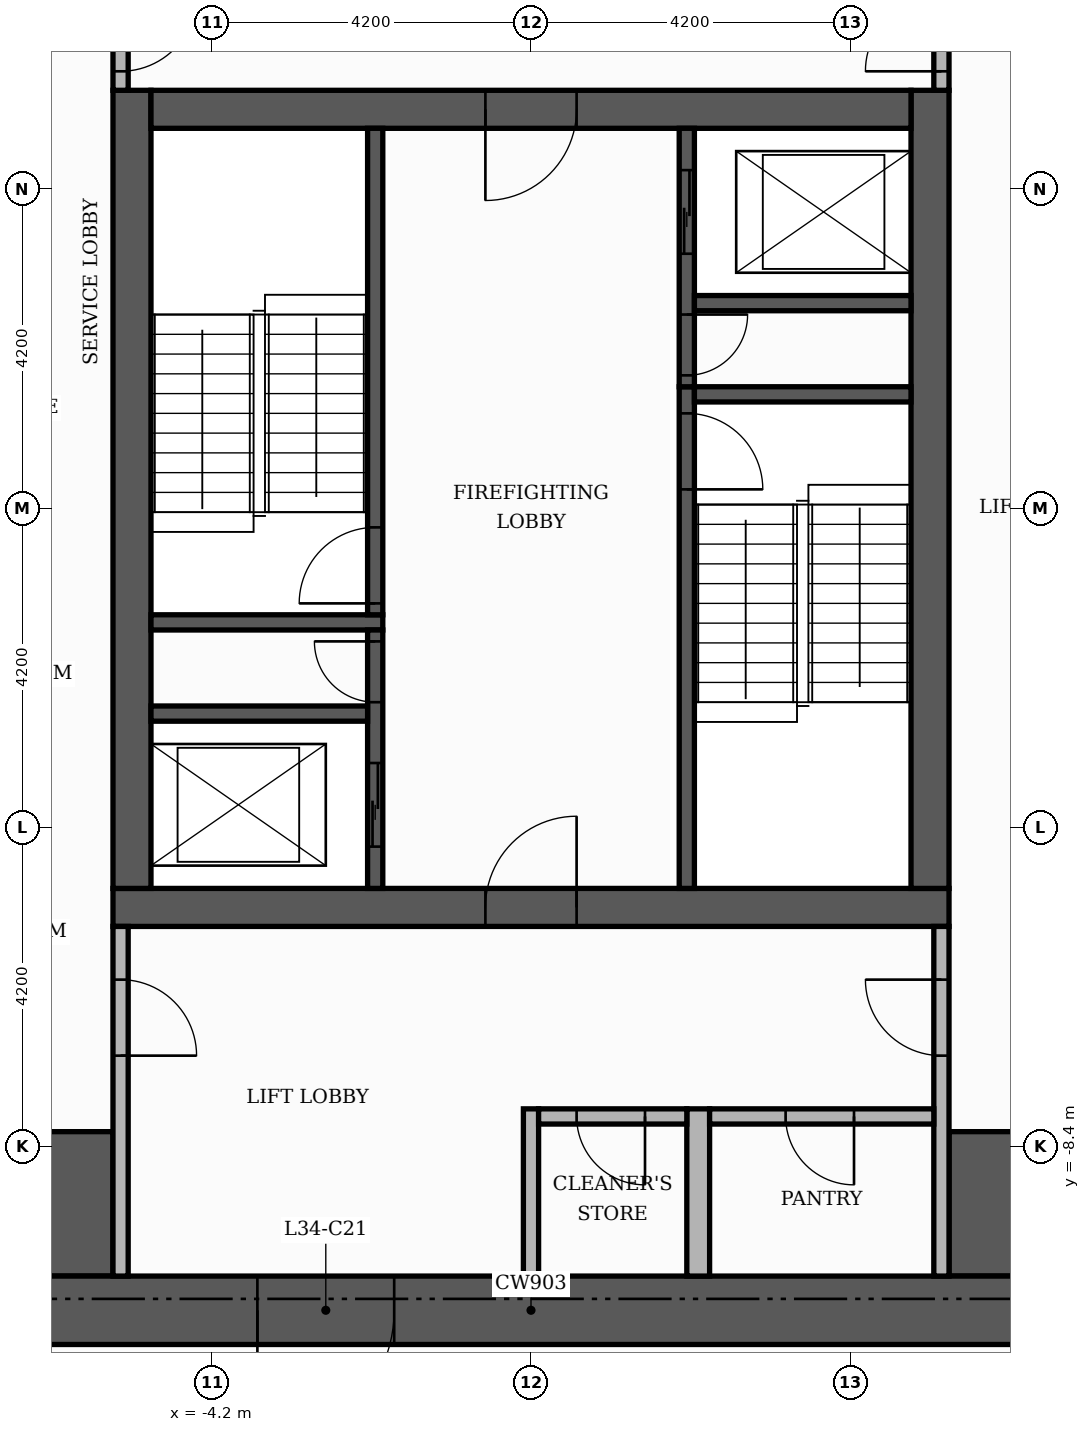
"""IFC4 building model, lengths in metres.
Left out: names, types, materials, properties, quantities, classifications, styles, units other than length and angle.
Written with IfcOpenShell. Run it as: python <this file> out.ifc"""

import sys

from ifc_helpers import new_model, si_unit, direction, frame, frame_2d, origin, place, context, subcontext, project, spatial, rectangle, extrude, element, fill, save


model = new_model("IFC4")
c1 = context("Model", 3, precision=1e-05, world=origin(), true_north=direction((0.0, 1.0)))
c2 = subcontext(c1, "Body", "Model", "MODEL_VIEW")
j1 = project(units=[si_unit("LENGTHUNIT", "METRE"), si_unit("PLANEANGLEUNIT", "RADIAN")], contexts=[c1])
p1 = place(None, origin())
s1 = spatial("IfcSite", under=j1, at=p1, CompositionType="ELEMENT")
p2 = place(p1, origin())
s2 = spatial("IfcBuilding", under=s1, at=p2, CompositionType="ELEMENT")
p3 = place(p2, frame((0.0, 0.0, 145.5)))
s3 = spatial("IfcBuildingStorey", under=s2, at=p3, CompositionType="ELEMENT", Elevation=145.5)
p4 = place(p3, frame((-5.5, -5.25, 0.0), z_axis=(0.0, 0.0, 1.0), x_axis=(1.0, 0.0, 0.0)))
e1 = element("IfcWall", 1, at=p4, inside=s3, PredefinedType="SHEAR", context=c2, shape_type="SweptSolid", body=[
    extrude(rectangle(XDim=11.0, YDim=0.5, at=frame_2d((5.5, 0.0))), origin(), (0.0, 0.0, 1.0), 3.48),
])
p5 = place(p4, frame((4.9, 0.0, 0.0)))
e2 = element("IfcOpeningElement", 2, at=p5, cuts=e1, PredefinedType="OPENING", context=c2, shape_type="SweptSolid", body=[
    extrude(rectangle(XDim=1.2, YDim=2.1, at=frame_2d((0.6, 1.05))), frame((0.0, 0.26, 0.0), z_axis=(0.0, -1.0, 0.0), x_axis=(1.0, 0.0, 0.0)), (0.0, 0.0, 1.0), 0.52),
])
for number, where, z_axis, x_axis in (
    (3, (-5.25, -5.0, 0.0), (0.0, 0.0, 1.0), (0.0, 1.0, 0.0)),
    (4, (5.25, -5.0, 0.0), (0.0, 0.0, 1.0), (0.0, 1.0, 0.0)),
):
    element("IfcWall", number, at=place(p3, frame(where, z_axis=z_axis, x_axis=x_axis)), inside=s3, PredefinedType="SHEAR", context=c2, shape_type="SweptSolid", body=[
        extrude(rectangle(XDim=10.5, YDim=0.5, at=frame_2d((5.25, 0.0))), origin(), (0.0, 0.0, 1.0), 3.48),
    ])
p6 = place(p3, frame((-5.0, 5.25, 0.0), z_axis=(0.0, 0.0, 1.0), x_axis=(1.0, 0.0, 0.0)))
e5 = element("IfcWall", 5, at=p6, inside=s3, PredefinedType="SHEAR", context=c2, shape_type="SweptSolid", body=[
    extrude(rectangle(XDim=10.0, YDim=0.5, at=frame_2d((5.0, 0.0))), origin(), (0.0, 0.0, 1.0), 3.48),
])
p7 = place(p6, frame((4.4, 0.0, 0.0)))
e6 = element("IfcOpeningElement", 6, at=p7, cuts=e5, PredefinedType="OPENING", context=c2, shape_type="SweptSolid", body=[
    extrude(rectangle(XDim=1.2, YDim=2.1, at=frame_2d((0.6, 1.05))), frame((0.0, 0.26, 0.0), z_axis=(0.0, -1.0, 0.0), x_axis=(1.0, 0.0, 0.0)), (0.0, 0.0, 1.0), 0.52),
])
for number, where, z_axis, x_axis in (
    (7, (-10.1, -9.15, 0.0), (0.0, 0.0, 1.0), (1.0, 0.0, 0.0)),
    (8, (5.5, -9.15, 0.0), (0.0, 0.0, 1.0), (1.0, 0.0, 0.0)),
):
    element("IfcWall", number, at=place(p3, frame(where, z_axis=z_axis, x_axis=x_axis)), inside=s3, PredefinedType="SHEAR", context=c2, shape_type="SweptSolid", body=[
        extrude(rectangle(XDim=4.6, YDim=1.9, at=frame_2d((2.3, 0.0))), origin(), (0.0, 0.0, 1.0), 3.48),
    ])
p8 = place(p3, frame((2.05, -5.0, 0.0), z_axis=(0.0, 0.0, 1.0), x_axis=(0.0, 1.0, 0.0)))
e9 = element("IfcWall", 9, at=p8, inside=s3, PredefinedType="SHEAR", context=c2, shape_type="SweptSolid", body=[
    extrude(rectangle(XDim=6.6, YDim=0.2, at=frame_2d((3.3, 0.0))), origin(), (0.0, 0.0, 1.0), 3.48),
])
p9 = place(p8, frame((5.25, 0.0, 0.0)))
e10 = element("IfcOpeningElement", 10, at=p9, cuts=e9, PredefinedType="OPENING", context=c2, shape_type="SweptSolid", body=[
    extrude(rectangle(XDim=1.0, YDim=2.1, at=frame_2d((0.5, 1.05))), frame((0.0, 0.11, 0.0), z_axis=(0.0, -1.0, 0.0), x_axis=(1.0, 0.0, 0.0)), (0.0, 0.0, 1.0), 0.22),
])
p10 = place(p3, frame((-5.0, -1.5, 0.0), z_axis=(0.0, 0.0, 1.0), x_axis=(1.0, 0.0, 0.0)))
e11 = element("IfcWall", 11, at=p10, inside=s3, PredefinedType="SHEAR", context=c2, shape_type="SweptSolid", body=[
    extrude(rectangle(XDim=3.05, YDim=0.2, at=frame_2d((1.525, 0.0))), origin(), (0.0, 0.0, 1.0), 3.48),
])
p11 = place(p3, frame((-2.05, -1.4, 0.0), z_axis=(0.0, 0.0, 1.0), x_axis=(0.0, 1.0, 0.0)))
e12 = element("IfcWall", 12, at=p11, inside=s3, PredefinedType="SHEAR", context=c2, shape_type="SweptSolid", body=[
    extrude(rectangle(XDim=6.4, YDim=0.2, at=frame_2d((3.2, 0.0))), origin(), (0.0, 0.0, 1.0), 3.48),
])
p12 = place(p11, frame((0.15, 0.0, 0.0)))
e13 = element("IfcOpeningElement", 13, at=p12, cuts=e12, PredefinedType="OPENING", context=c2, shape_type="SweptSolid", body=[
    extrude(rectangle(XDim=1.0, YDim=2.1, at=frame_2d((0.5, 1.05))), frame((0.0, 0.11, 0.0), z_axis=(0.0, -1.0, 0.0), x_axis=(1.0, 0.0, 0.0)), (0.0, 0.0, 1.0), 0.22),
])
p13 = place(p3, frame((2.15, 1.5, 0.0), z_axis=(0.0, 0.0, 1.0), x_axis=(1.0, 0.0, 0.0)))
e14 = element("IfcWall", 14, at=p13, inside=s3, PredefinedType="SHEAR", context=c2, shape_type="SweptSolid", body=[
    extrude(rectangle(XDim=2.85, YDim=0.2, at=frame_2d((1.425, 0.0))), origin(), (0.0, 0.0, 1.0), 3.48),
])
p14 = place(p3, frame((-2.05, -5.0, 0.0), z_axis=(0.0, 0.0, 1.0), x_axis=(0.0, 1.0, 0.0)))
e15 = element("IfcWall", 15, at=p14, inside=s3, PredefinedType="SHEAR", context=c2, shape_type="SweptSolid", body=[
    extrude(rectangle(XDim=3.4, YDim=0.2, at=frame_2d((1.7, 0.0))), origin(), (0.0, 0.0, 1.0), 3.48),
])
p15 = place(p14, frame((0.55, 0.0, 0.0)))
e16 = element("IfcOpeningElement", 16, at=p15, cuts=e15, PredefinedType="OPENING", context=c2, shape_type="SweptSolid", body=[
    extrude(rectangle(XDim=1.1, YDim=2.1, at=frame_2d((0.55, 1.05))), frame((0.0, 0.11, 0.0), z_axis=(0.0, -1.0, 0.0), x_axis=(1.0, 0.0, 0.0)), (0.0, 0.0, 1.0), 0.22),
])
p16 = place(p14, frame((2.45, 0.0, 0.0)))
e17 = element("IfcOpeningElement", 17, at=p16, cuts=e15, PredefinedType="OPENING", context=c2, shape_type="SweptSolid", body=[
    extrude(rectangle(XDim=0.8, YDim=2.1, at=frame_2d((0.4, 1.05))), frame((0.0, 0.11, 0.0), z_axis=(0.0, -1.0, 0.0), x_axis=(1.0, 0.0, 0.0)), (0.0, 0.0, 1.0), 0.22),
])
p17 = place(p3, frame((-5.0, -2.7, 0.0), z_axis=(0.0, 0.0, 1.0), x_axis=(1.0, 0.0, 0.0)))
e18 = element("IfcWall", 18, at=p17, inside=s3, PredefinedType="SHEAR", context=c2, shape_type="SweptSolid", body=[
    extrude(rectangle(XDim=2.85, YDim=0.2, at=frame_2d((1.425, 0.0))), origin(), (0.0, 0.0, 1.0), 3.48),
])
p18 = place(p3, frame((2.05, 1.6, 0.0), z_axis=(0.0, 0.0, 1.0), x_axis=(0.0, 1.0, 0.0)))
e19 = element("IfcWall", 19, at=p18, inside=s3, PredefinedType="SHEAR", context=c2, shape_type="SweptSolid", body=[
    extrude(rectangle(XDim=3.4, YDim=0.2, at=frame_2d((1.7, 0.0))), origin(), (0.0, 0.0, 1.0), 3.48),
])
p19 = place(p18, frame((1.75, 0.0, 0.0)))
e20 = element("IfcOpeningElement", 20, at=p19, cuts=e19, PredefinedType="OPENING", context=c2, shape_type="SweptSolid", body=[
    extrude(rectangle(XDim=1.1, YDim=2.1, at=frame_2d((0.55, 1.05))), frame((0.0, 0.11, 0.0), z_axis=(0.0, -1.0, 0.0), x_axis=(1.0, 0.0, 0.0)), (0.0, 0.0, 1.0), 0.22),
])
p20 = place(p18, frame((0.15, 0.0, 0.0)))
e21 = element("IfcOpeningElement", 21, at=p20, cuts=e19, PredefinedType="OPENING", context=c2, shape_type="SweptSolid", body=[
    extrude(rectangle(XDim=0.8, YDim=2.1, at=frame_2d((0.4, 1.05))), frame((0.0, 0.11, 0.0), z_axis=(0.0, -1.0, 0.0), x_axis=(1.0, 0.0, 0.0)), (0.0, 0.0, 1.0), 0.22),
])
p21 = place(p3, frame((2.15, 2.7, 0.0), z_axis=(0.0, 0.0, 1.0), x_axis=(1.0, 0.0, 0.0)))
e22 = element("IfcWall", 22, at=p21, inside=s3, PredefinedType="SHEAR", context=c2, shape_type="SweptSolid", body=[
    extrude(rectangle(XDim=2.85, YDim=0.2, at=frame_2d((1.425, 0.0))), origin(), (0.0, 0.0, 1.0), 3.48),
])
p22 = place(p3, frame((-11.0, -10.55, 0.0), z_axis=(0.0, 0.0, 1.0), x_axis=(1.0, 0.0, 0.0)))
e23 = element("IfcWall", 23, at=p22, inside=s3, PredefinedType="SHEAR", context=c2, shape_type="SweptSolid", body=[
    extrude(rectangle(XDim=22.0, YDim=0.9, at=frame_2d((11.0, 0.0))), origin(), (0.0, 0.0, 1.0), 3.48),
])
p23 = place(p22, frame((7.4, 0.0, 0.0)))
e24 = element("IfcOpeningElement", 24, at=p23, cuts=e23, PredefinedType="OPENING", context=c2, shape_type="SweptSolid", body=[
    extrude(rectangle(XDim=1.8, YDim=2.2, at=frame_2d((0.9, 1.1))), frame((0.0, 0.46, 0.0), z_axis=(0.0, -1.0, 0.0), x_axis=(1.0, 0.0, 0.0)), (0.0, 0.0, 1.0), 0.92),
])
p24 = place(p3, frame((-5.4, -10.1, 0.0), z_axis=(0.0, 0.0, 1.0), x_axis=(0.0, 1.0, 0.0)))
e25 = element("IfcWall", 25, at=p24, inside=s3, PredefinedType="PARTITIONING", context=c2, shape_type="SweptSolid", body=[
    extrude(rectangle(XDim=4.6, YDim=0.2, at=frame_2d((2.3, 0.0))), origin(), (0.0, 0.0, 1.0), 3.48),
])
p25 = place(p24, frame((2.9, 0.0, 0.0)))
e26 = element("IfcOpeningElement", 26, at=p25, cuts=e25, PredefinedType="OPENING", context=c2, shape_type="SweptSolid", body=[
    extrude(rectangle(XDim=1.0, YDim=2.1, at=frame_2d((0.5, 1.05))), frame((0.0, 0.11, 0.0), z_axis=(0.0, -1.0, 0.0), x_axis=(1.0, 0.0, 0.0)), (0.0, 0.0, 1.0), 0.22),
])
p26 = place(p3, frame((0.0, -10.1, 0.0), z_axis=(0.0, 0.0, 1.0), x_axis=(0.0, 1.0, 0.0)))
e27 = element("IfcWall", 27, at=p26, inside=s3, PredefinedType="PARTITIONING", context=c2, shape_type="SweptSolid", body=[
    extrude(rectangle(XDim=2.2, YDim=0.2, at=frame_2d((1.1, 0.0))), origin(), (0.0, 0.0, 1.0), 3.48),
])
p27 = place(p3, frame((2.2, -10.1, 0.0), z_axis=(0.0, 0.0, 1.0), x_axis=(0.0, 1.0, 0.0)))
e28 = element("IfcWall", 28, at=p27, inside=s3, PredefinedType="PARTITIONING", context=c2, shape_type="SweptSolid", body=[
    extrude(rectangle(XDim=2.2, YDim=0.3, at=frame_2d((1.1, 0.0))), origin(), (0.0, 0.0, 1.0), 3.48),
])
p28 = place(p3, frame((5.4, -10.1, 0.0), z_axis=(0.0, 0.0, 1.0), x_axis=(0.0, 1.0, 0.0)))
e29 = element("IfcWall", 29, at=p28, inside=s3, PredefinedType="PARTITIONING", context=c2, shape_type="SweptSolid", body=[
    extrude(rectangle(XDim=4.6, YDim=0.2, at=frame_2d((2.3, 0.0))), origin(), (0.0, 0.0, 1.0), 3.48),
])
p29 = place(p28, frame((2.9, 0.0, 0.0)))
e30 = element("IfcOpeningElement", 30, at=p29, cuts=e29, PredefinedType="OPENING", context=c2, shape_type="SweptSolid", body=[
    extrude(rectangle(XDim=1.0, YDim=2.1, at=frame_2d((0.5, 1.05))), frame((0.0, 0.11, 0.0), z_axis=(0.0, -1.0, 0.0), x_axis=(1.0, 0.0, 0.0)), (0.0, 0.0, 1.0), 0.22),
])
p30 = place(p3, frame((0.1, -8.0, 0.0), z_axis=(0.0, 0.0, 1.0), x_axis=(1.0, 0.0, 0.0)))
e31 = element("IfcWall", 31, at=p30, inside=s3, PredefinedType="PARTITIONING", context=c2, shape_type="SweptSolid", body=[
    extrude(rectangle(XDim=1.95, YDim=0.2, at=frame_2d((0.975, 0.0))), origin(), (0.0, 0.0, 1.0), 3.48),
])
p31 = place(p30, frame((0.5, 0.0, 0.0)))
e32 = element("IfcOpeningElement", 32, at=p31, cuts=e31, PredefinedType="OPENING", context=c2, shape_type="SweptSolid", body=[
    extrude(rectangle(XDim=0.9, YDim=2.1, at=frame_2d((0.45, 1.05))), frame((0.0, 0.11, 0.0), z_axis=(0.0, -1.0, 0.0), x_axis=(1.0, 0.0, 0.0)), (0.0, 0.0, 1.0), 0.22),
])
p32 = place(p3, frame((2.35, -8.0, 0.0), z_axis=(0.0, 0.0, 1.0), x_axis=(1.0, 0.0, 0.0)))
e33 = element("IfcWall", 33, at=p32, inside=s3, PredefinedType="PARTITIONING", context=c2, shape_type="SweptSolid", body=[
    extrude(rectangle(XDim=2.95, YDim=0.2, at=frame_2d((1.475, 0.0))), origin(), (0.0, 0.0, 1.0), 3.48),
])
p33 = place(p32, frame((1.0, 0.0, 0.0)))
e34 = element("IfcOpeningElement", 34, at=p33, cuts=e33, PredefinedType="OPENING", context=c2, shape_type="SweptSolid", body=[
    extrude(rectangle(XDim=0.9, YDim=2.1, at=frame_2d((0.45, 1.05))), frame((0.0, 0.11, 0.0), z_axis=(0.0, -1.0, 0.0), x_axis=(1.0, 0.0, 0.0)), (0.0, 0.0, 1.0), 0.22),
])
p34 = place(p3, frame((-5.4, 5.5, 0.0), z_axis=(0.0, 0.0, 1.0), x_axis=(0.0, 1.0, 0.0)))
e35 = element("IfcWall", 35, at=p34, inside=s3, PredefinedType="PARTITIONING", context=c2, shape_type="SweptSolid", body=[
    extrude(rectangle(XDim=1.55, YDim=0.2, at=frame_2d((0.775, 0.0))), origin(), (0.0, 0.0, 1.0), 3.48),
])
p35 = place(p34, frame((0.25, 0.0, 0.0)))
e36 = element("IfcOpeningElement", 36, at=p35, cuts=e35, PredefinedType="OPENING", context=c2, shape_type="SweptSolid", body=[
    extrude(rectangle(XDim=1.0, YDim=2.1, at=frame_2d((0.5, 1.05))), frame((0.0, 0.11, 0.0), z_axis=(0.0, -1.0, 0.0), x_axis=(1.0, 0.0, 0.0)), (0.0, 0.0, 1.0), 0.22),
])
p36 = place(p3, frame((5.4, 5.5, 0.0), z_axis=(0.0, 0.0, 1.0), x_axis=(0.0, 1.0, 0.0)))
e37 = element("IfcWall", 37, at=p36, inside=s3, PredefinedType="PARTITIONING", context=c2, shape_type="SweptSolid", body=[
    extrude(rectangle(XDim=4.6, YDim=0.2, at=frame_2d((2.3, 0.0))), origin(), (0.0, 0.0, 1.0), 3.48),
])
p37 = place(p36, frame((0.25, 0.0, 0.0)))
e38 = element("IfcOpeningElement", 38, at=p37, cuts=e37, PredefinedType="OPENING", context=c2, shape_type="SweptSolid", body=[
    extrude(rectangle(XDim=1.0, YDim=2.1, at=frame_2d((0.5, 1.05))), frame((0.0, 0.11, 0.0), z_axis=(0.0, -1.0, 0.0), x_axis=(1.0, 0.0, 0.0)), (0.0, 0.0, 1.0), 0.22),
])
p38 = place(p19, origin())
e39 = element("IfcDoor", 39, at=p38, inside=s3, OperationType="SLIDING_TO_LEFT", PredefinedType="DOOR", context=c2, shape_type="SweptSolid", body=[
    extrude(rectangle(XDim=1.1, YDim=2.1, at=frame_2d((0.55, 1.05))), frame((0.0, 0.025, 0.0), z_axis=(0.0, -1.0, 0.0), x_axis=(1.0, 0.0, 0.0)), (0.0, 0.0, 1.0), 0.05),
])
fill(e20, e39)
p39 = place(p15, origin())
e40 = element("IfcDoor", 40, at=p39, inside=s3, OperationType="SLIDING_TO_LEFT", PredefinedType="DOOR", context=c2, shape_type="SweptSolid", body=[
    extrude(rectangle(XDim=1.1, YDim=2.1, at=frame_2d((0.55, 1.05))), frame((0.0, 0.025, 0.0), z_axis=(0.0, -1.0, 0.0), x_axis=(1.0, 0.0, 0.0)), (0.0, 0.0, 1.0), 0.05),
])
fill(e16, e40)
p40 = place(p12, origin())
e41 = element("IfcDoor", 41, at=p40, inside=s3, OperationType="SINGLE_SWING_LEFT", PredefinedType="DOOR", context=c2, shape_type="SweptSolid", body=[
    extrude(rectangle(XDim=1.0, YDim=2.1, at=frame_2d((0.5, 1.05))), frame((0.0, 0.025, 0.0), z_axis=(0.0, -1.0, 0.0), x_axis=(1.0, 0.0, 0.0)), (0.0, 0.0, 1.0), 0.05),
])
fill(e13, e41)
p41 = place(p9, frame((1.0, 0.0, 0.0), z_axis=(0.0, 0.0, 1.0), x_axis=(-1.0, 0.0, 0.0)))
e42 = element("IfcDoor", 42, at=p41, inside=s3, OperationType="SINGLE_SWING_LEFT", PredefinedType="DOOR", context=c2, shape_type="SweptSolid", body=[
    extrude(rectangle(XDim=1.0, YDim=2.1, at=frame_2d((0.5, 1.05))), frame((0.0, 0.025, 0.0), z_axis=(0.0, -1.0, 0.0), x_axis=(1.0, 0.0, 0.0)), (0.0, 0.0, 1.0), 0.05),
])
fill(e10, e42)
p42 = place(p20, frame((0.8, 0.0, 0.0), z_axis=(0.0, 0.0, 1.0), x_axis=(-1.0, 0.0, 0.0)))
e43 = element("IfcDoor", 43, at=p42, inside=s3, OperationType="SINGLE_SWING_RIGHT", PredefinedType="DOOR", context=c2, shape_type="SweptSolid", body=[
    extrude(rectangle(XDim=0.8, YDim=2.1, at=frame_2d((0.4, 1.05))), frame((0.0, 0.025, 0.0), z_axis=(0.0, -1.0, 0.0), x_axis=(1.0, 0.0, 0.0)), (0.0, 0.0, 1.0), 0.05),
])
fill(e21, e43)
p43 = place(p16, origin())
e44 = element("IfcDoor", 44, at=p43, inside=s3, OperationType="SINGLE_SWING_RIGHT", PredefinedType="DOOR", context=c2, shape_type="SweptSolid", body=[
    extrude(rectangle(XDim=0.8, YDim=2.1, at=frame_2d((0.4, 1.05))), frame((0.0, 0.025, 0.0), z_axis=(0.0, -1.0, 0.0), x_axis=(1.0, 0.0, 0.0)), (0.0, 0.0, 1.0), 0.05),
])
fill(e17, e44)
p44 = place(p7, frame((1.2, 0.0, 0.0), z_axis=(0.0, 0.0, 1.0), x_axis=(-1.0, 0.0, 0.0)))
e45 = element("IfcDoor", 45, at=p44, inside=s3, OperationType="SINGLE_SWING_LEFT", PredefinedType="DOOR", context=c2, shape_type="SweptSolid", body=[
    extrude(rectangle(XDim=1.2, YDim=2.1, at=frame_2d((0.6, 1.05))), frame((0.0, 0.025, 0.0), z_axis=(0.0, -1.0, 0.0), x_axis=(1.0, 0.0, 0.0)), (0.0, 0.0, 1.0), 0.05),
])
fill(e6, e45)
p45 = place(p5, origin())
e46 = element("IfcDoor", 46, at=p45, inside=s3, OperationType="SINGLE_SWING_RIGHT", PredefinedType="DOOR", context=c2, shape_type="SweptSolid", body=[
    extrude(rectangle(XDim=1.2, YDim=2.1, at=frame_2d((0.6, 1.05))), frame((0.0, 0.025, 0.0), z_axis=(0.0, -1.0, 0.0), x_axis=(1.0, 0.0, 0.0)), (0.0, 0.0, 1.0), 0.05),
])
fill(e2, e46)
p46 = place(p35, frame((1.0, 0.0, 0.0), z_axis=(0.0, 0.0, 1.0), x_axis=(-1.0, 0.0, 0.0)))
e47 = element("IfcDoor", 47, at=p46, inside=s3, OperationType="SINGLE_SWING_RIGHT", PredefinedType="DOOR", context=c2, shape_type="SweptSolid", body=[
    extrude(rectangle(XDim=1.0, YDim=2.1, at=frame_2d((0.5, 1.05))), frame((0.0, 0.025, 0.0), z_axis=(0.0, -1.0, 0.0), x_axis=(1.0, 0.0, 0.0)), (0.0, 0.0, 1.0), 0.05),
])
fill(e36, e47)
p47 = place(p37, origin())
e48 = element("IfcDoor", 48, at=p47, inside=s3, OperationType="SINGLE_SWING_LEFT", PredefinedType="DOOR", context=c2, shape_type="SweptSolid", body=[
    extrude(rectangle(XDim=1.0, YDim=2.1, at=frame_2d((0.5, 1.05))), frame((0.0, 0.025, 0.0), z_axis=(0.0, -1.0, 0.0), x_axis=(1.0, 0.0, 0.0)), (0.0, 0.0, 1.0), 0.05),
])
fill(e38, e48)
p48 = place(p25, frame((1.0, 0.0, 0.0), z_axis=(0.0, 0.0, 1.0), x_axis=(-1.0, 0.0, 0.0)))
e49 = element("IfcDoor", 49, at=p48, inside=s3, OperationType="SINGLE_SWING_LEFT", PredefinedType="DOOR", context=c2, shape_type="SweptSolid", body=[
    extrude(rectangle(XDim=1.0, YDim=2.1, at=frame_2d((0.5, 1.05))), frame((0.0, 0.025, 0.0), z_axis=(0.0, -1.0, 0.0), x_axis=(1.0, 0.0, 0.0)), (0.0, 0.0, 1.0), 0.05),
])
fill(e26, e49)
p49 = place(p29, origin())
e50 = element("IfcDoor", 50, at=p49, inside=s3, OperationType="SINGLE_SWING_RIGHT", PredefinedType="DOOR", context=c2, shape_type="SweptSolid", body=[
    extrude(rectangle(XDim=1.0, YDim=2.1, at=frame_2d((0.5, 1.05))), frame((0.0, 0.025, 0.0), z_axis=(0.0, -1.0, 0.0), x_axis=(1.0, 0.0, 0.0)), (0.0, 0.0, 1.0), 0.05),
])
fill(e30, e50)
p50 = place(p23, frame((1.8, 0.0, 0.0), z_axis=(0.0, 0.0, 1.0), x_axis=(-1.0, 0.0, 0.0)))
e51 = element("IfcDoor", 51, at=p50, inside=s3, OperationType="DOUBLE_DOOR_SINGLE_SWING", PredefinedType="DOOR", context=c2, shape_type="SweptSolid", body=[
    extrude(rectangle(XDim=1.8, YDim=2.2, at=frame_2d((0.9, 1.1))), frame((0.0, 0.025, 0.0), z_axis=(0.0, -1.0, 0.0), x_axis=(1.0, 0.0, 0.0)), (0.0, 0.0, 1.0), 0.05),
])
fill(e24, e51)
p51 = place(p31, frame((0.9, 0.0, 0.0), z_axis=(0.0, 0.0, 1.0), x_axis=(-1.0, 0.0, 0.0)))
e52 = element("IfcDoor", 52, at=p51, inside=s3, OperationType="SINGLE_SWING_RIGHT", PredefinedType="DOOR", context=c2, shape_type="SweptSolid", body=[
    extrude(rectangle(XDim=0.9, YDim=2.1, at=frame_2d((0.45, 1.05))), frame((0.0, 0.025, 0.0), z_axis=(0.0, -1.0, 0.0), x_axis=(1.0, 0.0, 0.0)), (0.0, 0.0, 1.0), 0.05),
])
fill(e32, e52)
p52 = place(p33, frame((0.9, 0.0, 0.0), z_axis=(0.0, 0.0, 1.0), x_axis=(-1.0, 0.0, 0.0)))
e53 = element("IfcDoor", 53, at=p52, inside=s3, OperationType="SINGLE_SWING_RIGHT", PredefinedType="DOOR", context=c2, shape_type="SweptSolid", body=[
    extrude(rectangle(XDim=0.9, YDim=2.1, at=frame_2d((0.45, 1.05))), frame((0.0, 0.025, 0.0), z_axis=(0.0, -1.0, 0.0), x_axis=(1.0, 0.0, 0.0)), (0.0, 0.0, 1.0), 0.05),
])
fill(e34, e53)
save(model, sys.argv[1])
